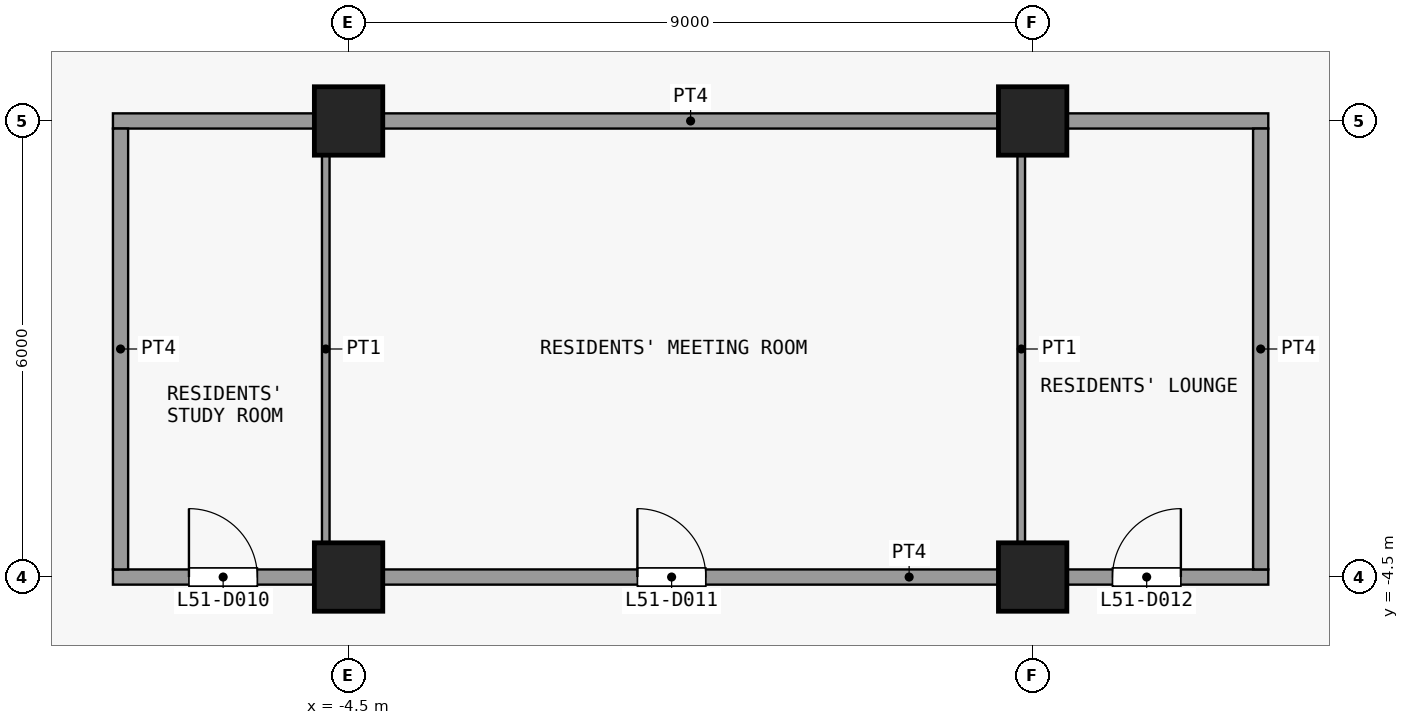
"""IFC4 building model, lengths in metres.
Left out: names, types, materials, properties, quantities, classifications, styles, units other than length and angle.
Written with IfcOpenShell. Run it as: python <this file> out.ifc"""

import sys

from ifc_helpers import new_model, si_unit, direction, frame, frame_2d, origin, origin_2d, place, context, subcontext, project, spatial, rectangle, extrude, element, fill, save


model = new_model("IFC4")
c1 = context("Model", 3, precision=1e-05, world=origin(), true_north=direction((0.0, 1.0)))
c2 = subcontext(c1, "Body", "Model", "MODEL_VIEW")
j1 = project(units=[si_unit("LENGTHUNIT", "METRE"), si_unit("PLANEANGLEUNIT", "RADIAN")], contexts=[c1])
p1 = place(None, origin())
s1 = spatial("IfcSite", under=j1, at=p1, CompositionType="ELEMENT")
p2 = place(p1, origin())
s2 = spatial("IfcBuilding", under=s1, at=p2, CompositionType="ELEMENT")
p3 = place(p2, frame((0.0, 0.0, 205.1)))
s3 = spatial("IfcBuildingStorey", under=s2, at=p3, CompositionType="ELEMENT", Elevation=205.1)
for number, where, z_axis, x_axis in (
    (1, (-4.5, -4.5, 0.0), (0.0, 0.0, 1.0), (1.0, 0.0, 0.0)),
    (2, (-4.5, 1.5, 0.0), (0.0, 0.0, 1.0), (1.0, 0.0, 0.0)),
    (3, (4.5, -4.5, 0.0), (0.0, 0.0, 1.0), (1.0, 0.0, 0.0)),
    (4, (4.5, 1.5, 0.0), (0.0, 0.0, 1.0), (1.0, 0.0, 0.0)),
):
    element("IfcColumn", number, at=place(p3, frame(where, z_axis=z_axis, x_axis=x_axis)), inside=s3, PredefinedType="COLUMN", context=c2, shape_type="SweptSolid", body=[
        extrude(rectangle(XDim=0.9, YDim=0.9, at=origin_2d()), origin(), (0.0, 0.0, 1.0), 3.6),
    ])
p4 = place(p3, frame((-7.6, -4.5, 0.0), z_axis=(0.0, 0.0, 1.0), x_axis=(1.0, 0.0, 0.0)))
e5 = element("IfcWall", 5, at=p4, inside=s3, PredefinedType="PARTITIONING", context=c2, shape_type="SweptSolid", body=[
    extrude(rectangle(XDim=15.2, YDim=0.2, at=frame_2d((7.6, 0.0))), origin(), (0.0, 0.0, 1.0), 3.3),
])
p5 = place(p4, frame((1.0, 0.0, 0.0)))
e6 = element("IfcOpeningElement", 6, at=p5, cuts=e5, PredefinedType="OPENING", context=c2, shape_type="SweptSolid", body=[
    extrude(rectangle(XDim=0.9, YDim=2.1, at=frame_2d((0.45, 1.05))), frame((0.0, 0.11, 0.0), z_axis=(0.0, -1.0, 0.0), x_axis=(1.0, 0.0, 0.0)), (0.0, 0.0, 1.0), 0.22),
])
p6 = place(p4, frame((6.9, 0.0, 0.0)))
e7 = element("IfcOpeningElement", 7, at=p6, cuts=e5, PredefinedType="OPENING", context=c2, shape_type="SweptSolid", body=[
    extrude(rectangle(XDim=0.9, YDim=2.1, at=frame_2d((0.45, 1.05))), frame((0.0, 0.11, 0.0), z_axis=(0.0, -1.0, 0.0), x_axis=(1.0, 0.0, 0.0)), (0.0, 0.0, 1.0), 0.22),
])
p7 = place(p4, frame((13.15, 0.0, 0.0)))
e8 = element("IfcOpeningElement", 8, at=p7, cuts=e5, PredefinedType="OPENING", context=c2, shape_type="SweptSolid", body=[
    extrude(rectangle(XDim=0.9, YDim=2.1, at=frame_2d((0.45, 1.05))), frame((0.0, 0.11, 0.0), z_axis=(0.0, -1.0, 0.0), x_axis=(1.0, 0.0, 0.0)), (0.0, 0.0, 1.0), 0.22),
])
p8 = place(p3, frame((-7.6, 1.5, 0.0), z_axis=(0.0, 0.0, 1.0), x_axis=(1.0, 0.0, 0.0)))
e9 = element("IfcWall", 9, at=p8, inside=s3, PredefinedType="PARTITIONING", context=c2, shape_type="SweptSolid", body=[
    extrude(rectangle(XDim=15.2, YDim=0.2, at=frame_2d((7.6, 0.0))), origin(), (0.0, 0.0, 1.0), 3.3),
])
p9 = place(p3, frame((-7.5, -4.4, 0.0), z_axis=(0.0, 0.0, 1.0), x_axis=(0.0, 1.0, 0.0)))
e10 = element("IfcWall", 10, at=p9, inside=s3, PredefinedType="PARTITIONING", context=c2, shape_type="SweptSolid", body=[
    extrude(rectangle(XDim=5.8, YDim=0.2, at=frame_2d((2.9, 0.0))), origin(), (0.0, 0.0, 1.0), 3.3),
])
for number, where, z_axis, x_axis in (
    (11, (-4.8, -4.4, 0.0), (0.0, 0.0, 1.0), (0.0, 1.0, 0.0)),
    (12, (4.35, -4.4, 0.0), (0.0, 0.0, 1.0), (0.0, 1.0, 0.0)),
):
    element("IfcWall", number, at=place(p3, frame(where, z_axis=z_axis, x_axis=x_axis)), inside=s3, PredefinedType="PARTITIONING", context=c2, shape_type="SweptSolid", body=[
        extrude(rectangle(XDim=5.8, YDim=0.1, at=frame_2d((2.9, 0.0))), origin(), (0.0, 0.0, 1.0), 3.3),
    ])
p10 = place(p3, frame((7.5, -4.4, 0.0), z_axis=(0.0, 0.0, 1.0), x_axis=(0.0, 1.0, 0.0)))
e13 = element("IfcWall", 13, at=p10, inside=s3, PredefinedType="PARTITIONING", context=c2, shape_type="SweptSolid", body=[
    extrude(rectangle(XDim=5.8, YDim=0.2, at=frame_2d((2.9, 0.0))), origin(), (0.0, 0.0, 1.0), 3.3),
])
p11 = place(p5, origin())
e14 = element("IfcDoor", 14, at=p11, inside=s3, OperationType="SINGLE_SWING_RIGHT", PredefinedType="DOOR", context=c2, shape_type="SweptSolid", body=[
    extrude(rectangle(XDim=0.9, YDim=2.1, at=frame_2d((0.45, 1.05))), frame((0.0, 0.025, 0.0), z_axis=(0.0, -1.0, 0.0), x_axis=(1.0, 0.0, 0.0)), (0.0, 0.0, 1.0), 0.05),
])
fill(e6, e14)
p12 = place(p6, origin())
e15 = element("IfcDoor", 15, at=p12, inside=s3, OperationType="SINGLE_SWING_RIGHT", PredefinedType="DOOR", context=c2, shape_type="SweptSolid", body=[
    extrude(rectangle(XDim=0.9, YDim=2.1, at=frame_2d((0.45, 1.05))), frame((0.0, 0.025, 0.0), z_axis=(0.0, -1.0, 0.0), x_axis=(1.0, 0.0, 0.0)), (0.0, 0.0, 1.0), 0.05),
])
fill(e7, e15)
p13 = place(p7, origin())
e16 = element("IfcDoor", 16, at=p13, inside=s3, OperationType="SINGLE_SWING_LEFT", PredefinedType="DOOR", context=c2, shape_type="SweptSolid", body=[
    extrude(rectangle(XDim=0.9, YDim=2.1, at=frame_2d((0.45, 1.05))), frame((0.0, 0.025, 0.0), z_axis=(0.0, -1.0, 0.0), x_axis=(1.0, 0.0, 0.0)), (0.0, 0.0, 1.0), 0.05),
])
fill(e8, e16)
save(model, sys.argv[1])
